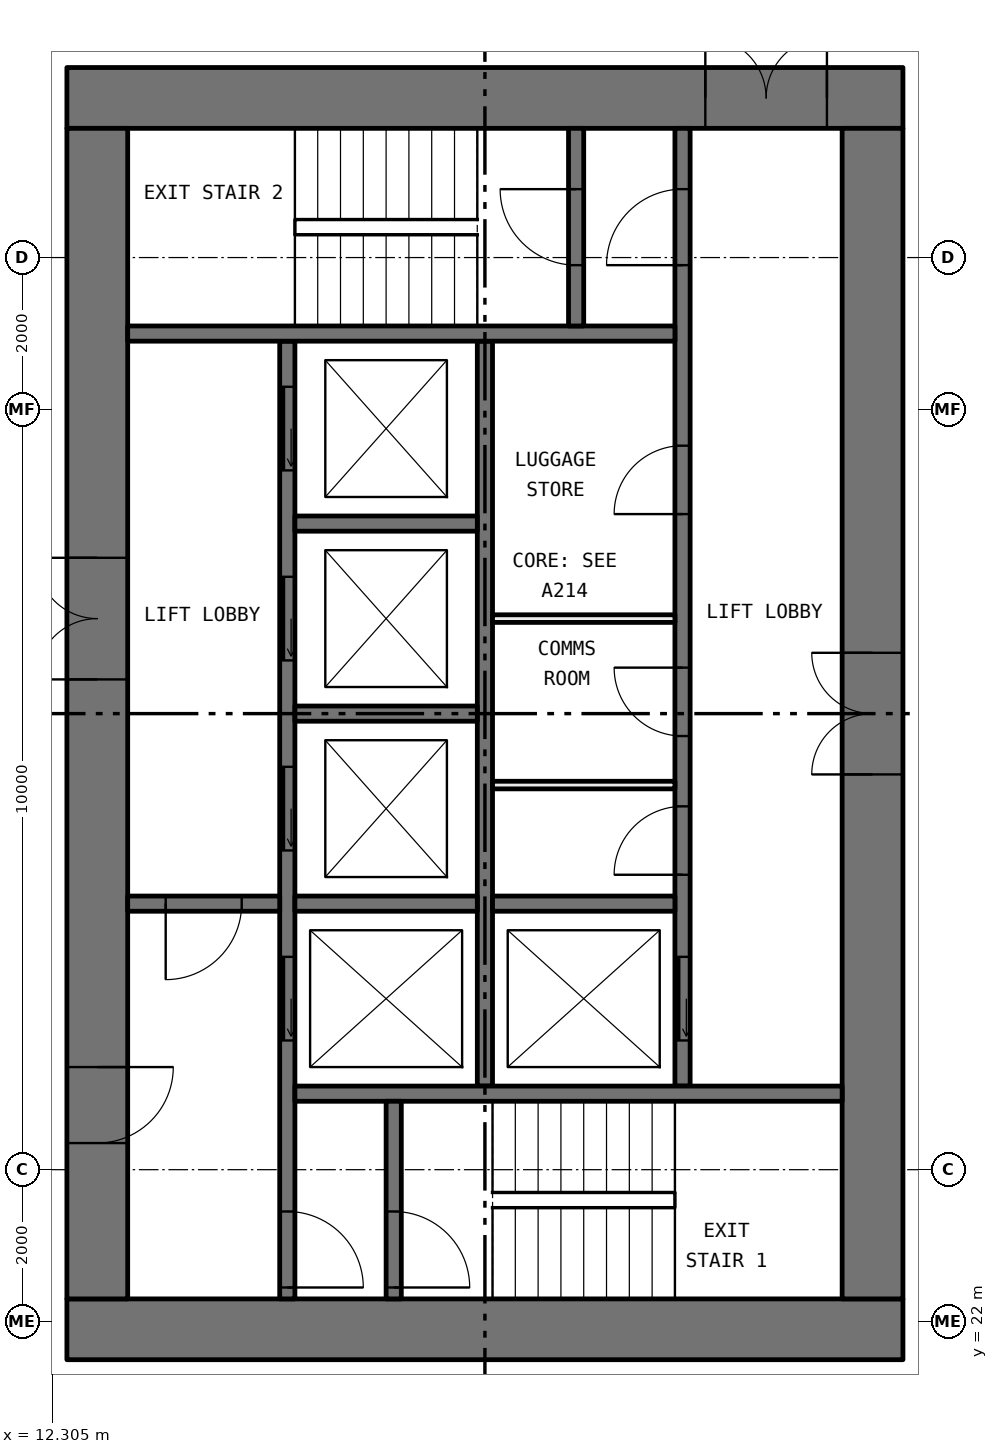
"""IFC4 building model, lengths in metres.
Left out: names, types, materials, properties, quantities, classifications, styles, units other than length and angle.
Written with IfcOpenShell. Run it as: python <this file> out.ifc"""

import sys

from ifc_helpers import new_model, si_unit, direction, frame, frame_2d, origin, place, context, subcontext, project, spatial, rectangle, extrude, element, fill, save


model = new_model("IFC4")
c1 = context("Model", 3, precision=1e-05, world=origin(), true_north=direction((0.0, 1.0)))
c2 = subcontext(c1, "Body", "Model", "MODEL_VIEW")
j1 = project(units=[si_unit("LENGTHUNIT", "METRE"), si_unit("PLANEANGLEUNIT", "RADIAN")], contexts=[c1])
p1 = place(None, origin())
s1 = spatial("IfcSite", under=j1, at=p1, CompositionType="ELEMENT")
p2 = place(p1, origin())
s2 = spatial("IfcBuilding", under=s1, at=p2, CompositionType="ELEMENT")
p3 = place(p2, frame((0.0, 0.0, 57.6)))
s3 = spatial("IfcBuildingStorey", under=s2, at=p3, CompositionType="ELEMENT", Elevation=57.6)
p4 = place(p3, frame((12.5, 21.9, 0.0), z_axis=(0.0, 0.0, 1.0), x_axis=(1.0, 0.0, 0.0)))
e1 = element("IfcWall", 1, at=p4, inside=s3, PredefinedType="SHEAR", context=c2, shape_type="SweptSolid", body=[
    extrude(rectangle(XDim=11.0, YDim=0.8, at=frame_2d((5.5, 0.0))), origin(), (0.0, 0.0, 1.0), 3.05),
])
p5 = place(p3, frame((12.5, 38.1, 0.0), z_axis=(0.0, 0.0, 1.0), x_axis=(1.0, 0.0, 0.0)))
e2 = element("IfcWall", 2, at=p5, inside=s3, PredefinedType="SHEAR", context=c2, shape_type="SweptSolid", body=[
    extrude(rectangle(XDim=11.0, YDim=0.8, at=frame_2d((5.5, 0.0))), origin(), (0.0, 0.0, 1.0), 3.05),
])
p6 = place(p5, frame((8.4, 0.0, 0.0)))
e3 = element("IfcOpeningElement", 3, at=p6, cuts=e2, PredefinedType="OPENING", context=c2, shape_type="SweptSolid", body=[
    extrude(rectangle(XDim=1.6, YDim=2.1, at=frame_2d((0.8, 1.05))), frame((0.0, 0.41, 0.0), z_axis=(0.0, -1.0, 0.0), x_axis=(1.0, 0.0, 0.0)), (0.0, 0.0, 1.0), 0.82),
])
p7 = place(p3, frame((12.9, 22.3, 0.0), z_axis=(0.0, 0.0, 1.0), x_axis=(0.0, 1.0, 0.0)))
e4 = element("IfcWall", 4, at=p7, inside=s3, PredefinedType="SHEAR", context=c2, shape_type="SweptSolid", body=[
    extrude(rectangle(XDim=15.4, YDim=0.8, at=frame_2d((7.7, 0.0))), origin(), (0.0, 0.0, 1.0), 3.05),
])
p8 = place(p7, frame((8.15, 0.0, 0.0)))
e5 = element("IfcOpeningElement", 5, at=p8, cuts=e4, PredefinedType="OPENING", context=c2, shape_type="SweptSolid", body=[
    extrude(rectangle(XDim=1.6, YDim=2.1, at=frame_2d((0.8, 1.05))), frame((0.0, 0.41, 0.0), z_axis=(0.0, -1.0, 0.0), x_axis=(1.0, 0.0, 0.0)), (0.0, 0.0, 1.0), 0.82),
])
p9 = place(p7, frame((2.05, 0.0, 0.0)))
e6 = element("IfcOpeningElement", 6, at=p9, cuts=e4, PredefinedType="OPENING", context=c2, shape_type="SweptSolid", body=[
    extrude(rectangle(XDim=1.0, YDim=2.1, at=frame_2d((0.5, 1.05))), frame((0.0, 0.41, 0.0), z_axis=(0.0, -1.0, 0.0), x_axis=(1.0, 0.0, 0.0)), (0.0, 0.0, 1.0), 0.82),
])
p10 = place(p3, frame((23.1, 22.3, 0.0), z_axis=(0.0, 0.0, 1.0), x_axis=(0.0, 1.0, 0.0)))
e7 = element("IfcWall", 7, at=p10, inside=s3, PredefinedType="SHEAR", context=c2, shape_type="SweptSolid", body=[
    extrude(rectangle(XDim=15.4, YDim=0.8, at=frame_2d((7.7, 0.0))), origin(), (0.0, 0.0, 1.0), 3.05),
])
p11 = place(p10, frame((6.9, 0.0, 0.0)))
e8 = element("IfcOpeningElement", 8, at=p11, cuts=e7, PredefinedType="OPENING", context=c2, shape_type="SweptSolid", body=[
    extrude(rectangle(XDim=1.6, YDim=2.1, at=frame_2d((0.8, 1.05))), frame((0.0, 0.41, 0.0), z_axis=(0.0, -1.0, 0.0), x_axis=(1.0, 0.0, 0.0)), (0.0, 0.0, 1.0), 0.82),
])
p12 = place(p3, frame((15.4, 22.3, 0.0), z_axis=(0.0, 0.0, 1.0), x_axis=(0.0, 1.0, 0.0)))
e9 = element("IfcWall", 9, at=p12, inside=s3, PredefinedType="SOLIDWALL", context=c2, shape_type="SweptSolid", body=[
    extrude(rectangle(XDim=12.6, YDim=0.2, at=frame_2d((6.3, 0.0))), origin(), (0.0, 0.0, 1.0), 3.05),
])
p13 = place(p12, frame((3.4, 0.0, 0.0)))
e10 = element("IfcOpeningElement", 10, at=p13, cuts=e9, PredefinedType="OPENING", context=c2, shape_type="SweptSolid", body=[
    extrude(rectangle(XDim=1.1, YDim=2.1, at=frame_2d((0.55, 1.05))), frame((0.0, 0.11, 0.0), z_axis=(0.0, -1.0, 0.0), x_axis=(1.0, 0.0, 0.0)), (0.0, 0.0, 1.0), 0.22),
])
p14 = place(p12, frame((5.9, 0.0, 0.0)))
e11 = element("IfcOpeningElement", 11, at=p14, cuts=e9, PredefinedType="OPENING", context=c2, shape_type="SweptSolid", body=[
    extrude(rectangle(XDim=1.1, YDim=2.1, at=frame_2d((0.55, 1.05))), frame((0.0, 0.11, 0.0), z_axis=(0.0, -1.0, 0.0), x_axis=(1.0, 0.0, 0.0)), (0.0, 0.0, 1.0), 0.22),
])
p15 = place(p12, frame((8.4, 0.0, 0.0)))
e12 = element("IfcOpeningElement", 12, at=p15, cuts=e9, PredefinedType="OPENING", context=c2, shape_type="SweptSolid", body=[
    extrude(rectangle(XDim=1.1, YDim=2.1, at=frame_2d((0.55, 1.05))), frame((0.0, 0.11, 0.0), z_axis=(0.0, -1.0, 0.0), x_axis=(1.0, 0.0, 0.0)), (0.0, 0.0, 1.0), 0.22),
])
p16 = place(p12, frame((10.9, 0.0, 0.0)))
e13 = element("IfcOpeningElement", 13, at=p16, cuts=e9, PredefinedType="OPENING", context=c2, shape_type="SweptSolid", body=[
    extrude(rectangle(XDim=1.1, YDim=2.1, at=frame_2d((0.55, 1.05))), frame((0.0, 0.11, 0.0), z_axis=(0.0, -1.0, 0.0), x_axis=(1.0, 0.0, 0.0)), (0.0, 0.0, 1.0), 0.22),
])
p17 = place(p12, frame((0.15, 0.0, 0.0)))
e14 = element("IfcOpeningElement", 14, at=p17, cuts=e9, PredefinedType="OPENING", context=c2, shape_type="SweptSolid", body=[
    extrude(rectangle(XDim=1.0, YDim=2.1, at=frame_2d((0.5, 1.05))), frame((0.0, 0.11, 0.0), z_axis=(0.0, -1.0, 0.0), x_axis=(1.0, 0.0, 0.0)), (0.0, 0.0, 1.0), 0.22),
])
p18 = place(p3, frame((20.6, 25.1, 0.0), z_axis=(0.0, 0.0, 1.0), x_axis=(0.0, 1.0, 0.0)))
e15 = element("IfcWall", 15, at=p18, inside=s3, PredefinedType="SOLIDWALL", context=c2, shape_type="SweptSolid", body=[
    extrude(rectangle(XDim=12.6, YDim=0.2, at=frame_2d((6.3, 0.0))), origin(), (0.0, 0.0, 1.0), 3.05),
])
p19 = place(p18, frame((0.6, 0.0, 0.0)))
e16 = element("IfcOpeningElement", 16, at=p19, cuts=e15, PredefinedType="OPENING", context=c2, shape_type="SweptSolid", body=[
    extrude(rectangle(XDim=1.1, YDim=2.1, at=frame_2d((0.55, 1.05))), frame((0.0, 0.11, 0.0), z_axis=(0.0, -1.0, 0.0), x_axis=(1.0, 0.0, 0.0)), (0.0, 0.0, 1.0), 0.22),
])
p20 = place(p18, frame((10.8, 0.0, 0.0)))
e17 = element("IfcOpeningElement", 17, at=p20, cuts=e15, PredefinedType="OPENING", context=c2, shape_type="SweptSolid", body=[
    extrude(rectangle(XDim=1.0, YDim=2.1, at=frame_2d((0.5, 1.05))), frame((0.0, 0.11, 0.0), z_axis=(0.0, -1.0, 0.0), x_axis=(1.0, 0.0, 0.0)), (0.0, 0.0, 1.0), 0.22),
])
p21 = place(p18, frame((2.78, 0.0, 0.0)))
e18 = element("IfcOpeningElement", 18, at=p21, cuts=e15, PredefinedType="OPENING", context=c2, shape_type="SweptSolid", body=[
    extrude(rectangle(XDim=0.9, YDim=2.1, at=frame_2d((0.45, 1.05))), frame((0.0, 0.11, 0.0), z_axis=(0.0, -1.0, 0.0), x_axis=(1.0, 0.0, 0.0)), (0.0, 0.0, 1.0), 0.22),
])
p22 = place(p18, frame((4.605, 0.0, 0.0)))
e19 = element("IfcOpeningElement", 19, at=p22, cuts=e15, PredefinedType="OPENING", context=c2, shape_type="SweptSolid", body=[
    extrude(rectangle(XDim=0.9, YDim=2.1, at=frame_2d((0.45, 1.05))), frame((0.0, 0.11, 0.0), z_axis=(0.0, -1.0, 0.0), x_axis=(1.0, 0.0, 0.0)), (0.0, 0.0, 1.0), 0.22),
])
p23 = place(p18, frame((7.525, 0.0, 0.0)))
e20 = element("IfcOpeningElement", 20, at=p23, cuts=e15, PredefinedType="OPENING", context=c2, shape_type="SweptSolid", body=[
    extrude(rectangle(XDim=0.9, YDim=2.1, at=frame_2d((0.45, 1.05))), frame((0.0, 0.11, 0.0), z_axis=(0.0, -1.0, 0.0), x_axis=(1.0, 0.0, 0.0)), (0.0, 0.0, 1.0), 0.22),
])
p24 = place(p3, frame((18.0, 25.1, 0.0), z_axis=(0.0, 0.0, 1.0), x_axis=(0.0, 1.0, 0.0)))
e21 = element("IfcWall", 21, at=p24, inside=s3, PredefinedType="SOLIDWALL", context=c2, shape_type="SweptSolid", body=[
    extrude(rectangle(XDim=9.8, YDim=0.2, at=frame_2d((4.9, 0.0))), origin(), (0.0, 0.0, 1.0), 3.05),
])
for number, where, z_axis, x_axis in (
    (22, (15.5, 25.0, 0.0), (0.0, 0.0, 1.0), (1.0, 0.0, 0.0)),
    (23, (13.3, 35.0, 0.0), (0.0, 0.0, 1.0), (1.0, 0.0, 0.0)),
):
    element("IfcWall", number, at=place(p3, frame(where, z_axis=z_axis, x_axis=x_axis)), inside=s3, PredefinedType="SOLIDWALL", context=c2, shape_type="SweptSolid", body=[
        extrude(rectangle(XDim=7.2, YDim=0.2, at=frame_2d((3.6, 0.0))), origin(), (0.0, 0.0, 1.0), 3.05),
    ])
p25 = place(p3, frame((13.3, 27.5, 0.0), z_axis=(0.0, 0.0, 1.0), x_axis=(1.0, 0.0, 0.0)))
e24 = element("IfcWall", 24, at=p25, inside=s3, PredefinedType="SOLIDWALL", context=c2, shape_type="SweptSolid", body=[
    extrude(rectangle(XDim=2.0, YDim=0.2, at=frame_2d((1.0, 0.0))), origin(), (0.0, 0.0, 1.0), 3.05),
])
p26 = place(p25, frame((0.5, 0.0, 0.0)))
e25 = element("IfcOpeningElement", 25, at=p26, cuts=e24, PredefinedType="OPENING", context=c2, shape_type="SweptSolid", body=[
    extrude(rectangle(XDim=1.0, YDim=2.1, at=frame_2d((0.5, 1.05))), frame((0.0, 0.11, 0.0), z_axis=(0.0, -1.0, 0.0), x_axis=(1.0, 0.0, 0.0)), (0.0, 0.0, 1.0), 0.22),
])
p27 = place(p3, frame((16.8, 22.3, 0.0), z_axis=(0.0, 0.0, 1.0), x_axis=(0.0, 1.0, 0.0)))
e26 = element("IfcWall", 26, at=p27, inside=s3, PredefinedType="SOLIDWALL", context=c2, shape_type="SweptSolid", body=[
    extrude(rectangle(XDim=2.6, YDim=0.2, at=frame_2d((1.3, 0.0))), origin(), (0.0, 0.0, 1.0), 3.05),
])
p28 = place(p27, frame((0.15, 0.0, 0.0)))
e27 = element("IfcOpeningElement", 27, at=p28, cuts=e26, PredefinedType="OPENING", context=c2, shape_type="SweptSolid", body=[
    extrude(rectangle(XDim=1.0, YDim=2.1, at=frame_2d((0.5, 1.05))), frame((0.0, 0.11, 0.0), z_axis=(0.0, -1.0, 0.0), x_axis=(1.0, 0.0, 0.0)), (0.0, 0.0, 1.0), 0.22),
])
p29 = place(p3, frame((19.2, 35.1, 0.0), z_axis=(0.0, 0.0, 1.0), x_axis=(0.0, 1.0, 0.0)))
e28 = element("IfcWall", 28, at=p29, inside=s3, PredefinedType="SOLIDWALL", context=c2, shape_type="SweptSolid", body=[
    extrude(rectangle(XDim=2.6, YDim=0.2, at=frame_2d((1.3, 0.0))), origin(), (0.0, 0.0, 1.0), 3.05),
])
p30 = place(p29, frame((0.8, 0.0, 0.0)))
e29 = element("IfcOpeningElement", 29, at=p30, cuts=e28, PredefinedType="OPENING", context=c2, shape_type="SweptSolid", body=[
    extrude(rectangle(XDim=1.0, YDim=2.1, at=frame_2d((0.5, 1.05))), frame((0.0, 0.11, 0.0), z_axis=(0.0, -1.0, 0.0), x_axis=(1.0, 0.0, 0.0)), (0.0, 0.0, 1.0), 0.22),
])
for number, where, z_axis, x_axis in (
    (30, (15.5, 27.5, 0.0), (0.0, 0.0, 1.0), (1.0, 0.0, 0.0)),
    (31, (15.5, 30.0, 0.0), (0.0, 0.0, 1.0), (1.0, 0.0, 0.0)),
    (32, (15.5, 32.5, 0.0), (0.0, 0.0, 1.0), (1.0, 0.0, 0.0)),
    (33, (18.1, 27.5, 0.0), (0.0, 0.0, 1.0), (1.0, 0.0, 0.0)),
):
    element("IfcWall", number, at=place(p3, frame(where, z_axis=z_axis, x_axis=x_axis)), inside=s3, PredefinedType="SOLIDWALL", context=c2, shape_type="SweptSolid", body=[
        extrude(rectangle(XDim=2.4, YDim=0.2, at=frame_2d((1.2, 0.0))), origin(), (0.0, 0.0, 1.0), 3.05),
    ])
for number, where, z_axis, x_axis in (
    (34, (18.1, 29.06, 0.0), (0.0, 0.0, 1.0), (1.0, 0.0, 0.0)),
    (35, (18.1, 31.25, 0.0), (0.0, 0.0, 1.0), (1.0, 0.0, 0.0)),
):
    element("IfcWall", number, at=place(p3, frame(where, z_axis=z_axis, x_axis=x_axis)), inside=s3, PredefinedType="PARTITIONING", context=c2, shape_type="SweptSolid", body=[
        extrude(rectangle(XDim=2.4, YDim=0.1, at=frame_2d((1.2, 0.0))), origin(), (0.0, 0.0, 1.0), 3.05),
    ])
p31 = place(p19, origin())
e36 = element("IfcDoor", 36, at=p31, inside=s3, OperationType="SLIDING_TO_LEFT", PredefinedType="DOOR", context=c2, shape_type="SweptSolid", body=[
    extrude(rectangle(XDim=1.1, YDim=2.1, at=frame_2d((0.55, 1.05))), frame((0.0, 0.025, 0.0), z_axis=(0.0, -1.0, 0.0), x_axis=(1.0, 0.0, 0.0)), (0.0, 0.0, 1.0), 0.05),
])
fill(e16, e36)
p32 = place(p13, origin())
e37 = element("IfcDoor", 37, at=p32, inside=s3, OperationType="SLIDING_TO_LEFT", PredefinedType="DOOR", context=c2, shape_type="SweptSolid", body=[
    extrude(rectangle(XDim=1.1, YDim=2.1, at=frame_2d((0.55, 1.05))), frame((0.0, 0.025, 0.0), z_axis=(0.0, -1.0, 0.0), x_axis=(1.0, 0.0, 0.0)), (0.0, 0.0, 1.0), 0.05),
])
fill(e10, e37)
p33 = place(p14, origin())
e38 = element("IfcDoor", 38, at=p33, inside=s3, OperationType="SLIDING_TO_LEFT", PredefinedType="DOOR", context=c2, shape_type="SweptSolid", body=[
    extrude(rectangle(XDim=1.1, YDim=2.1, at=frame_2d((0.55, 1.05))), frame((0.0, 0.025, 0.0), z_axis=(0.0, -1.0, 0.0), x_axis=(1.0, 0.0, 0.0)), (0.0, 0.0, 1.0), 0.05),
])
fill(e11, e38)
p34 = place(p15, origin())
e39 = element("IfcDoor", 39, at=p34, inside=s3, OperationType="SLIDING_TO_LEFT", PredefinedType="DOOR", context=c2, shape_type="SweptSolid", body=[
    extrude(rectangle(XDim=1.1, YDim=2.1, at=frame_2d((0.55, 1.05))), frame((0.0, 0.025, 0.0), z_axis=(0.0, -1.0, 0.0), x_axis=(1.0, 0.0, 0.0)), (0.0, 0.0, 1.0), 0.05),
])
fill(e12, e39)
p35 = place(p16, origin())
e40 = element("IfcDoor", 40, at=p35, inside=s3, OperationType="SLIDING_TO_LEFT", PredefinedType="DOOR", context=c2, shape_type="SweptSolid", body=[
    extrude(rectangle(XDim=1.1, YDim=2.1, at=frame_2d((0.55, 1.05))), frame((0.0, 0.025, 0.0), z_axis=(0.0, -1.0, 0.0), x_axis=(1.0, 0.0, 0.0)), (0.0, 0.0, 1.0), 0.05),
])
fill(e13, e40)
p36 = place(p28, frame((1.0, 0.0, 0.0), x_axis=(-1.0, 0.0, 0.0)))
e41 = element("IfcDoor", 41, at=p36, inside=s3, OperationType="SINGLE_SWING_LEFT", PredefinedType="DOOR", context=c2, shape_type="SweptSolid", body=[
    extrude(rectangle(XDim=1.0, YDim=2.1, at=frame_2d((0.5, 1.05))), frame((0.0, 0.025, 0.0), z_axis=(0.0, -1.0, 0.0), x_axis=(1.0, 0.0, 0.0)), (0.0, 0.0, 1.0), 0.05),
])
fill(e27, e41)
p37 = place(p17, frame((1.0, 0.0, 0.0), x_axis=(-1.0, 0.0, 0.0)))
e42 = element("IfcDoor", 42, at=p37, inside=s3, OperationType="SINGLE_SWING_LEFT", PredefinedType="DOOR", context=c2, shape_type="SweptSolid", body=[
    extrude(rectangle(XDim=1.0, YDim=2.1, at=frame_2d((0.5, 1.05))), frame((0.0, 0.025, 0.0), z_axis=(0.0, -1.0, 0.0), x_axis=(1.0, 0.0, 0.0)), (0.0, 0.0, 1.0), 0.05),
])
fill(e14, e42)
p38 = place(p20, origin())
e43 = element("IfcDoor", 43, at=p38, inside=s3, OperationType="SINGLE_SWING_RIGHT", PredefinedType="DOOR", context=c2, shape_type="SweptSolid", body=[
    extrude(rectangle(XDim=1.0, YDim=2.1, at=frame_2d((0.5, 1.05))), frame((0.0, 0.025, 0.0), z_axis=(0.0, -1.0, 0.0), x_axis=(1.0, 0.0, 0.0)), (0.0, 0.0, 1.0), 0.05),
])
fill(e17, e43)
p39 = place(p30, origin())
e44 = element("IfcDoor", 44, at=p39, inside=s3, OperationType="SINGLE_SWING_LEFT", PredefinedType="DOOR", context=c2, shape_type="SweptSolid", body=[
    extrude(rectangle(XDim=1.0, YDim=2.1, at=frame_2d((0.5, 1.05))), frame((0.0, 0.025, 0.0), z_axis=(0.0, -1.0, 0.0), x_axis=(1.0, 0.0, 0.0)), (0.0, 0.0, 1.0), 0.05),
])
fill(e29, e44)
p40 = place(p26, frame((1.0, 0.0, 0.0), x_axis=(-1.0, 0.0, 0.0)))
e45 = element("IfcDoor", 45, at=p40, inside=s3, OperationType="SINGLE_SWING_LEFT", PredefinedType="DOOR", context=c2, shape_type="SweptSolid", body=[
    extrude(rectangle(XDim=1.0, YDim=2.1, at=frame_2d((0.5, 1.05))), frame((0.0, 0.025, 0.0), z_axis=(0.0, -1.0, 0.0), x_axis=(1.0, 0.0, 0.0)), (0.0, 0.0, 1.0), 0.05),
])
fill(e25, e45)
p41 = place(p8, origin())
e46 = element("IfcDoor", 46, at=p41, inside=s3, OperationType="DOUBLE_DOOR_SINGLE_SWING", PredefinedType="DOOR", context=c2, shape_type="SweptSolid", body=[
    extrude(rectangle(XDim=1.6, YDim=2.1, at=frame_2d((0.8, 1.05))), frame((0.0, 0.025, 0.0), z_axis=(0.0, -1.0, 0.0), x_axis=(1.0, 0.0, 0.0)), (0.0, 0.0, 1.0), 0.05),
])
fill(e5, e46)
p42 = place(p9, frame((1.0, 0.0, 0.0), x_axis=(-1.0, 0.0, 0.0)))
e47 = element("IfcDoor", 47, at=p42, inside=s3, OperationType="SINGLE_SWING_RIGHT", PredefinedType="DOOR", context=c2, shape_type="SweptSolid", body=[
    extrude(rectangle(XDim=1.0, YDim=2.1, at=frame_2d((0.5, 1.05))), frame((0.0, 0.025, 0.0), z_axis=(0.0, -1.0, 0.0), x_axis=(1.0, 0.0, 0.0)), (0.0, 0.0, 1.0), 0.05),
])
fill(e6, e47)
p43 = place(p6, origin())
e48 = element("IfcDoor", 48, at=p43, inside=s3, OperationType="DOUBLE_DOOR_SINGLE_SWING", PredefinedType="DOOR", context=c2, shape_type="SweptSolid", body=[
    extrude(rectangle(XDim=1.6, YDim=2.1, at=frame_2d((0.8, 1.05))), frame((0.0, 0.025, 0.0), z_axis=(0.0, -1.0, 0.0), x_axis=(1.0, 0.0, 0.0)), (0.0, 0.0, 1.0), 0.05),
])
fill(e3, e48)
p44 = place(p11, origin())
e49 = element("IfcDoor", 49, at=p44, inside=s3, OperationType="DOUBLE_DOOR_SINGLE_SWING", PredefinedType="DOOR", context=c2, shape_type="SweptSolid", body=[
    extrude(rectangle(XDim=1.6, YDim=2.1, at=frame_2d((0.8, 1.05))), frame((0.0, 0.025, 0.0), z_axis=(0.0, -1.0, 0.0), x_axis=(1.0, 0.0, 0.0)), (0.0, 0.0, 1.0), 0.05),
])
fill(e8, e49)
p45 = place(p21, origin())
e50 = element("IfcDoor", 50, at=p45, inside=s3, OperationType="SINGLE_SWING_RIGHT", PredefinedType="DOOR", context=c2, shape_type="SweptSolid", body=[
    extrude(rectangle(XDim=0.9, YDim=2.1, at=frame_2d((0.45, 1.05))), frame((0.0, 0.025, 0.0), z_axis=(0.0, -1.0, 0.0), x_axis=(1.0, 0.0, 0.0)), (0.0, 0.0, 1.0), 0.05),
])
fill(e18, e50)
p46 = place(p22, origin())
e51 = element("IfcDoor", 51, at=p46, inside=s3, OperationType="SINGLE_SWING_LEFT", PredefinedType="DOOR", context=c2, shape_type="SweptSolid", body=[
    extrude(rectangle(XDim=0.9, YDim=2.1, at=frame_2d((0.45, 1.05))), frame((0.0, 0.025, 0.0), z_axis=(0.0, -1.0, 0.0), x_axis=(1.0, 0.0, 0.0)), (0.0, 0.0, 1.0), 0.05),
])
fill(e19, e51)
p47 = place(p23, origin())
e52 = element("IfcDoor", 52, at=p47, inside=s3, OperationType="SINGLE_SWING_RIGHT", PredefinedType="DOOR", context=c2, shape_type="SweptSolid", body=[
    extrude(rectangle(XDim=0.9, YDim=2.1, at=frame_2d((0.45, 1.05))), frame((0.0, 0.025, 0.0), z_axis=(0.0, -1.0, 0.0), x_axis=(1.0, 0.0, 0.0)), (0.0, 0.0, 1.0), 0.05),
])
fill(e20, e52)
save(model, sys.argv[1])
